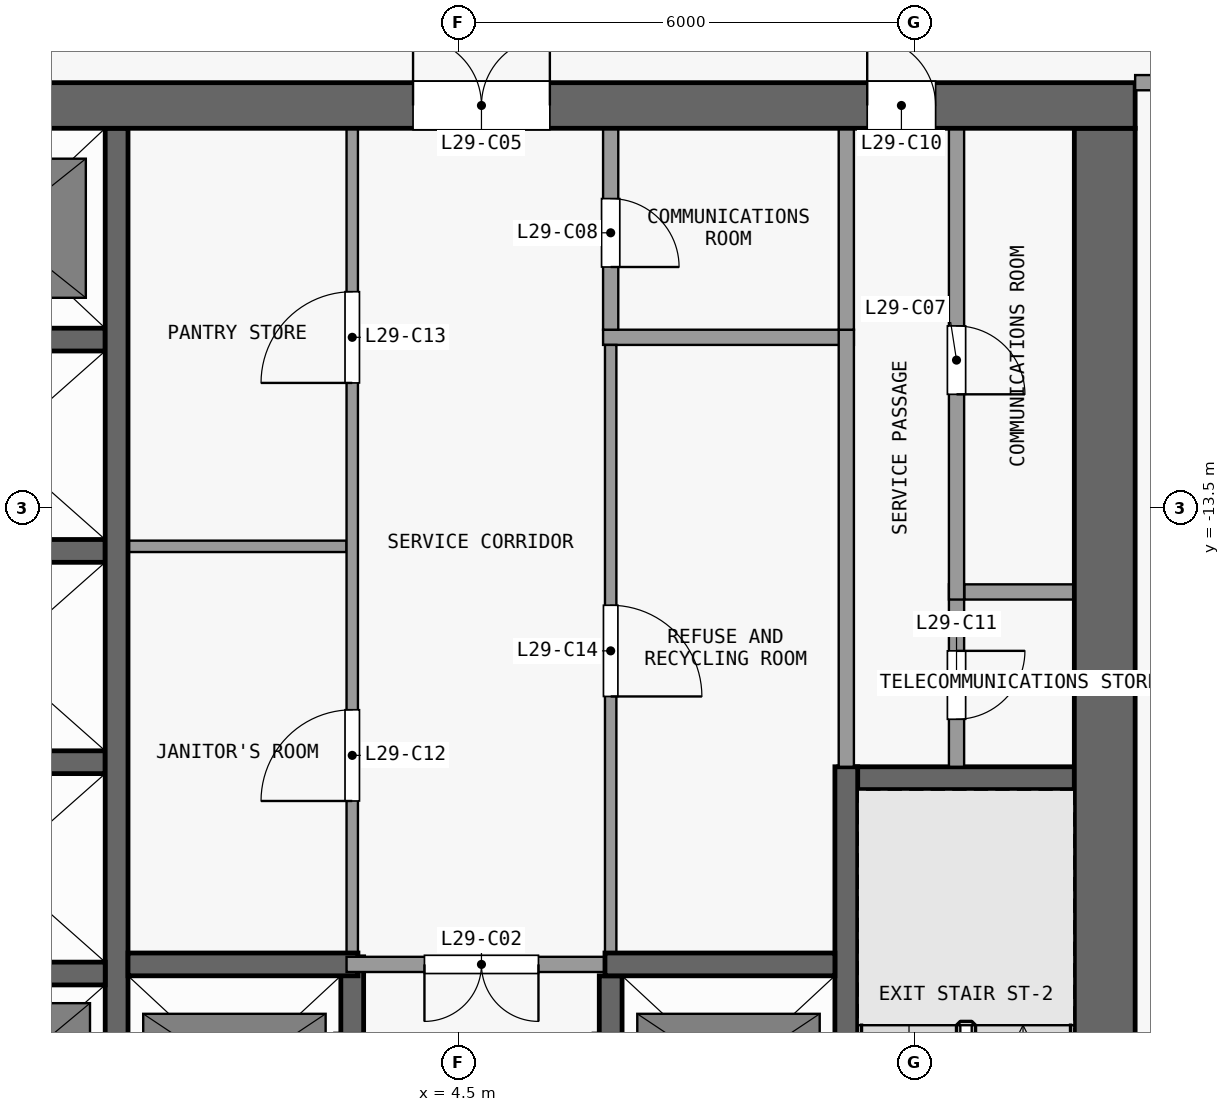
"""IFC4 building model, lengths in metres.
Left out: names, types, materials, properties, quantities, classifications, styles, units other than length and angle.
Written with IfcOpenShell. Run it as: python <this file> out.ifc"""

import sys

from ifc_helpers import new_model, si_unit, direction, frame, frame_2d, origin, place, context, subcontext, project, spatial, rectangle, extrude, element, fill, save


model = new_model("IFC4")
c1 = context("Model", 3, precision=1e-05, world=origin(), true_north=direction((0.0, 1.0)))
c2 = subcontext(c1, "Body", "Model", "MODEL_VIEW")
j1 = project(units=[si_unit("LENGTHUNIT", "METRE"), si_unit("PLANEANGLEUNIT", "RADIAN")], contexts=[c1])
p1 = place(None, origin())
s1 = spatial("IfcSite", under=j1, at=p1, CompositionType="ELEMENT")
p2 = place(p1, origin())
s2 = spatial("IfcBuilding", under=s1, at=p2, CompositionType="ELEMENT")
p3 = place(p2, frame((0.0, 0.0, 117.1)))
s3 = spatial("IfcBuildingStorey", under=s2, at=p3, CompositionType="ELEMENT", Elevation=117.1)
p4 = place(p3, frame((-13.4, -8.2, 0.0), z_axis=(0.0, 0.0, 1.0), x_axis=(1.0, 0.0, 0.0)))
e1 = element("IfcWall", 1, at=p4, inside=s3, PredefinedType="SHEAR", context=c2, shape_type="SweptSolid", body=[
    extrude(rectangle(XDim=26.8, YDim=0.6, at=frame_2d((13.4, 0.0))), origin(), (0.0, 0.0, 1.0), 3.3),
])
p5 = place(p4, frame((7.7, 0.0, 0.0)))
e2 = element("IfcOpeningElement", 2, at=p5, cuts=e1, PredefinedType="OPENING", context=c2, shape_type="SweptSolid", body=[
    extrude(rectangle(XDim=1.8, YDim=2.1, at=frame_2d((0.9, 1.05))), frame((0.0, 0.31, 0.0), z_axis=(0.0, -1.0, 0.0), x_axis=(1.0, 0.0, 0.0)), (0.0, 0.0, 1.0), 0.62),
])
p6 = place(p4, frame((17.3, 0.0, 0.0)))
e3 = element("IfcOpeningElement", 3, at=p6, cuts=e1, PredefinedType="OPENING", context=c2, shape_type="SweptSolid", body=[
    extrude(rectangle(XDim=1.8, YDim=2.1, at=frame_2d((0.9, 1.05))), frame((0.0, 0.31, 0.0), z_axis=(0.0, -1.0, 0.0), x_axis=(1.0, 0.0, 0.0)), (0.0, 0.0, 1.0), 0.62),
])
p7 = place(p4, frame((1.625, 0.0, 0.0)))
e4 = element("IfcOpeningElement", 4, at=p7, cuts=e1, PredefinedType="OPENING", context=c2, shape_type="SweptSolid", body=[
    extrude(rectangle(XDim=1.2, YDim=2.1, at=frame_2d((0.6, 1.05))), frame((0.0, 0.31, 0.0), z_axis=(0.0, -1.0, 0.0), x_axis=(1.0, 0.0, 0.0)), (0.0, 0.0, 1.0), 0.62),
])
p8 = place(p4, frame((23.275, 0.0, 0.0)))
e5 = element("IfcOpeningElement", 5, at=p8, cuts=e1, PredefinedType="OPENING", context=c2, shape_type="SweptSolid", body=[
    extrude(rectangle(XDim=0.9, YDim=2.1, at=frame_2d((0.45, 1.05))), frame((0.0, 0.31, 0.0), z_axis=(0.0, -1.0, 0.0), x_axis=(1.0, 0.0, 0.0)), (0.0, 0.0, 1.0), 0.62),
])
p9 = place(p3, frame((13.0, -24.6, 0.0), z_axis=(0.0, 0.0, 1.0), x_axis=(0.0, 1.0, 0.0)))
e6 = element("IfcWall", 6, at=p9, inside=s3, PredefinedType="SHEAR", context=c2, shape_type="SweptSolid", body=[
    extrude(rectangle(XDim=16.1, YDim=0.8, at=frame_2d((8.05, 0.0))), origin(), (0.0, 0.0, 1.0), 3.3),
])
p10 = place(p3, frame((-2.95, -19.62, 0.0), z_axis=(0.0, 0.0, 1.0), x_axis=(1.0, 0.0, 0.0)))
e7 = element("IfcWall", 7, at=p10, inside=s3, PredefinedType="SHEAR", context=c2, shape_type="SweptSolid", body=[
    extrude(rectangle(XDim=2.8, YDim=0.3, at=frame_2d((1.4, 0.0))), origin(), (0.0, 0.0, 1.0), 3.3),
])
p11 = place(p3, frame((0.15, -19.5, 0.0), z_axis=(0.0, 0.0, 1.0), x_axis=(1.0, 0.0, 0.0)))
e8 = element("IfcWall", 8, at=p11, inside=s3, PredefinedType="SHEAR", context=c2, shape_type="SweptSolid", body=[
    extrude(rectangle(XDim=3.025, YDim=0.3, at=frame_2d((1.513, 0.0))), origin(), (0.0, 0.0, 1.0), 3.3),
])
p12 = place(p3, frame((6.575, -19.5, 0.0), z_axis=(0.0, 0.0, 1.0), x_axis=(-1.0, 0.0, 0.0)))
e9 = element("IfcWall", 9, at=p12, inside=s3, PredefinedType="PARTITIONING", context=c2, shape_type="SweptSolid", body=[
    extrude(rectangle(XDim=3.55, YDim=0.2, at=frame_2d((1.775, 0.0))), origin(), (0.0, 0.0, 1.0), 3.3),
])
p13 = place(p12, frame((1.025, 0.0, 0.0)))
e10 = element("IfcOpeningElement", 10, at=p13, cuts=e9, PredefinedType="OPENING", context=c2, shape_type="SweptSolid", body=[
    extrude(rectangle(XDim=1.5, YDim=2.1, at=frame_2d((0.75, 1.05))), frame((0.0, 0.11, 0.0), z_axis=(0.0, -1.0, 0.0), x_axis=(1.0, 0.0, 0.0)), (0.0, 0.0, 1.0), 0.22),
])
p14 = place(p3, frame((6.425, -19.5, 0.0), z_axis=(0.0, 0.0, 1.0), x_axis=(1.0, 0.0, 0.0)))
e11 = element("IfcWall", 11, at=p14, inside=s3, PredefinedType="SHEAR", context=c2, shape_type="SweptSolid", body=[
    extrude(rectangle(XDim=3.025, YDim=0.3, at=frame_2d((1.512, 0.0))), origin(), (0.0, 0.0, 1.0), 3.3),
])
p15 = place(p3, frame((9.5, -17.05, 0.0), z_axis=(0.0, 0.0, 1.0), x_axis=(1.0, 0.0, 0.0)))
e12 = element("IfcWall", 12, at=p15, inside=s3, PredefinedType="SHEAR", context=c2, shape_type="SweptSolid", body=[
    extrude(rectangle(XDim=3.1, YDim=0.3, at=frame_2d((1.55, 0.0))), origin(), (0.0, 0.0, 1.0), 3.3),
])
p16 = place(p3, frame((-2.95, -16.84, 0.0), z_axis=(0.0, 0.0, 1.0), x_axis=(1.0, 0.0, 0.0)))
e13 = element("IfcWall", 13, at=p16, inside=s3, PredefinedType="SHEAR", context=c2, shape_type="SweptSolid", body=[
    extrude(rectangle(XDim=2.8, YDim=0.3, at=frame_2d((1.4, 0.0))), origin(), (0.0, 0.0, 1.0), 3.3),
])
p17 = place(p3, frame((11.15, -14.6, 0.0), z_axis=(0.0, 0.0, 1.0), x_axis=(1.0, 0.0, 0.0)))
e14 = element("IfcWall", 14, at=p17, inside=s3, PredefinedType="PARTITIONING", context=c2, shape_type="SweptSolid", body=[
    extrude(rectangle(XDim=1.45, YDim=0.2, at=frame_2d((0.725, 0.0))), origin(), (0.0, 0.0, 1.0), 3.3),
])
p18 = place(p3, frame((-2.95, -14.06, 0.0), z_axis=(0.0, 0.0, 1.0), x_axis=(1.0, 0.0, 0.0)))
e15 = element("IfcWall", 15, at=p18, inside=s3, PredefinedType="SHEAR", context=c2, shape_type="SweptSolid", body=[
    extrude(rectangle(XDim=2.8, YDim=0.3, at=frame_2d((1.4, 0.0))), origin(), (0.0, 0.0, 1.0), 3.3),
])
p19 = place(p3, frame((0.15, -14.0, 0.0), z_axis=(0.0, 0.0, 1.0), x_axis=(1.0, 0.0, 0.0)))
e16 = element("IfcWall", 16, at=p19, inside=s3, PredefinedType="PARTITIONING", context=c2, shape_type="SweptSolid", body=[
    extrude(rectangle(XDim=2.875, YDim=0.15, at=frame_2d((1.438, 0.0))), origin(), (0.0, 0.0, 1.0), 3.3),
])
p20 = place(p3, frame((-2.95, -11.28, 0.0), z_axis=(0.0, 0.0, 1.0), x_axis=(1.0, 0.0, 0.0)))
e17 = element("IfcWall", 17, at=p20, inside=s3, PredefinedType="SHEAR", context=c2, shape_type="SweptSolid", body=[
    extrude(rectangle(XDim=2.8, YDim=0.3, at=frame_2d((1.4, 0.0))), origin(), (0.0, 0.0, 1.0), 3.3),
])
p21 = place(p3, frame((6.4, -11.25, 0.0), z_axis=(0.0, 0.0, 1.0), x_axis=(1.0, 0.0, 0.0)))
e18 = element("IfcWall", 18, at=p21, inside=s3, PredefinedType="PARTITIONING", context=c2, shape_type="SweptSolid", body=[
    extrude(rectangle(XDim=3.3, YDim=0.2, at=frame_2d((1.65, 0.0))), origin(), (0.0, 0.0, 1.0), 3.3),
])
p22 = place(p3, frame((0.0, -22.25, 0.0), z_axis=(0.0, 0.0, 1.0), x_axis=(0.0, 1.0, 0.0)))
e19 = element("IfcWall", 19, at=p22, inside=s3, PredefinedType="SHEAR", context=c2, shape_type="SweptSolid", body=[
    extrude(rectangle(XDim=13.75, YDim=0.3, at=frame_2d((6.875, 0.0))), origin(), (0.0, 0.0, 1.0), 3.3),
])
p23 = place(p3, frame((3.1, -22.25, 0.0), z_axis=(0.0, 0.0, 1.0), x_axis=(0.0, 1.0, 0.0)))
e20 = element("IfcWall", 20, at=p23, inside=s3, PredefinedType="SHEAR", context=c2, shape_type="SweptSolid", body=[
    extrude(rectangle(XDim=2.85, YDim=0.3, at=frame_2d((1.425, 0.0))), origin(), (0.0, 0.0, 1.0), 3.3),
])
p24 = place(p23, frame((0.75, 0.0, 0.0)))
e21 = element("IfcOpeningElement", 21, at=p24, cuts=e20, PredefinedType="OPENING", context=c2, shape_type="SweptSolid", body=[
    extrude(rectangle(XDim=1.1, YDim=2.1, at=frame_2d((0.55, 1.05))), frame((0.0, 0.16, 0.0), z_axis=(0.0, -1.0, 0.0), x_axis=(1.0, 0.0, 0.0)), (0.0, 0.0, 1.0), 0.32),
])
p25 = place(p3, frame((3.1, -19.4, 0.0), z_axis=(0.0, 0.0, 1.0), x_axis=(0.0, 1.0, 0.0)))
e22 = element("IfcWall", 22, at=p25, inside=s3, PredefinedType="PARTITIONING", context=c2, shape_type="SweptSolid", body=[
    extrude(rectangle(XDim=10.9, YDim=0.15, at=frame_2d((5.45, 0.0))), origin(), (0.0, 0.0, 1.0), 3.3),
])
p26 = place(p25, frame((2.05, 0.0, 0.0)))
e23 = element("IfcOpeningElement", 23, at=p26, cuts=e22, PredefinedType="OPENING", context=c2, shape_type="SweptSolid", body=[
    extrude(rectangle(XDim=1.2, YDim=2.1, at=frame_2d((0.6, 1.05))), frame((0.0, 0.085, 0.0), z_axis=(0.0, -1.0, 0.0), x_axis=(1.0, 0.0, 0.0)), (0.0, 0.0, 1.0), 0.17),
])
p27 = place(p25, frame((7.55, 0.0, 0.0)))
e24 = element("IfcOpeningElement", 24, at=p27, cuts=e22, PredefinedType="OPENING", context=c2, shape_type="SweptSolid", body=[
    extrude(rectangle(XDim=1.2, YDim=2.1, at=frame_2d((0.6, 1.05))), frame((0.0, 0.085, 0.0), z_axis=(0.0, -1.0, 0.0), x_axis=(1.0, 0.0, 0.0)), (0.0, 0.0, 1.0), 0.17),
])
p28 = place(p3, frame((6.5, -22.25, 0.0), z_axis=(0.0, 0.0, 1.0), x_axis=(0.0, 1.0, 0.0)))
e25 = element("IfcWall", 25, at=p28, inside=s3, PredefinedType="SHEAR", context=c2, shape_type="SweptSolid", body=[
    extrude(rectangle(XDim=2.6, YDim=0.3, at=frame_2d((1.3, 0.0))), origin(), (0.0, 0.0, 1.0), 3.3),
])
p29 = place(p28, frame((0.75, 0.0, 0.0)))
e26 = element("IfcOpeningElement", 26, at=p29, cuts=e25, PredefinedType="OPENING", context=c2, shape_type="SweptSolid", body=[
    extrude(rectangle(XDim=1.1, YDim=2.1, at=frame_2d((0.55, 1.05))), frame((0.0, 0.16, 0.0), z_axis=(0.0, -1.0, 0.0), x_axis=(1.0, 0.0, 0.0)), (0.0, 0.0, 1.0), 0.32),
])
p30 = place(p3, frame((6.5, -11.35, 0.0), z_axis=(0.0, 0.0, 1.0), x_axis=(0.0, -1.0, 0.0)))
e27 = element("IfcWall", 27, at=p30, inside=s3, PredefinedType="PARTITIONING", context=c2, shape_type="SweptSolid", body=[
    extrude(rectangle(XDim=8.0, YDim=0.15, at=frame_2d((4.0, 0.0))), origin(), (0.0, 0.0, 1.0), 3.3),
])
p31 = place(p30, frame((3.425, 0.0, 0.0)))
e28 = element("IfcOpeningElement", 28, at=p31, cuts=e27, PredefinedType="OPENING", context=c2, shape_type="SweptSolid", body=[
    extrude(rectangle(XDim=1.2, YDim=2.1, at=frame_2d((0.6, 1.05))), frame((0.0, 0.085, 0.0), z_axis=(0.0, -1.0, 0.0), x_axis=(1.0, 0.0, 0.0)), (0.0, 0.0, 1.0), 0.17),
])
p32 = place(p3, frame((6.5, -8.5, 0.0), z_axis=(0.0, 0.0, 1.0), x_axis=(0.0, -1.0, 0.0)))
e29 = element("IfcWall", 29, at=p32, inside=s3, PredefinedType="PARTITIONING", context=c2, shape_type="SweptSolid", body=[
    extrude(rectangle(XDim=2.65, YDim=0.2, at=frame_2d((1.325, 0.0))), origin(), (0.0, 0.0, 1.0), 3.3),
])
p33 = place(p32, frame((0.925, 0.0, 0.0)))
e30 = element("IfcOpeningElement", 30, at=p33, cuts=e29, PredefinedType="OPENING", context=c2, shape_type="SweptSolid", body=[
    extrude(rectangle(XDim=0.9, YDim=2.1, at=frame_2d((0.45, 1.05))), frame((0.0, 0.11, 0.0), z_axis=(0.0, -1.0, 0.0), x_axis=(1.0, 0.0, 0.0)), (0.0, 0.0, 1.0), 0.22),
])
p34 = place(p3, frame((9.6, -16.9, 0.0), z_axis=(0.0, 0.0, 1.0), x_axis=(0.0, -1.0, 0.0)))
e31 = element("IfcWall", 31, at=p34, inside=s3, PredefinedType="SHEAR", context=c2, shape_type="SweptSolid", body=[
    extrude(rectangle(XDim=7.7, YDim=0.3, at=frame_2d((3.85, 0.0))), origin(), (0.0, 0.0, 1.0), 3.3),
])
p35 = place(p34, frame((6.5, 0.0, 0.0)))
e32 = element("IfcOpeningElement", 32, at=p35, cuts=e31, PredefinedType="OPENING", context=c2, shape_type="SweptSolid", body=[
    extrude(rectangle(XDim=1.1, YDim=2.1, at=frame_2d((0.55, 1.05))), frame((0.0, 0.16, 0.0), z_axis=(0.0, -1.0, 0.0), x_axis=(1.0, 0.0, 0.0)), (0.0, 0.0, 1.0), 0.32),
])
p36 = place(p3, frame((9.6, -16.9, 0.0), z_axis=(0.0, 0.0, 1.0), x_axis=(0.0, 1.0, 0.0)))
e33 = element("IfcWall", 33, at=p36, inside=s3, PredefinedType="PARTITIONING", context=c2, shape_type="SweptSolid", body=[
    extrude(rectangle(XDim=5.75, YDim=0.2, at=frame_2d((2.875, 0.0))), origin(), (0.0, 0.0, 1.0), 3.3),
])
p37 = place(p3, frame((9.6, -11.15, 0.0), z_axis=(0.0, 0.0, 1.0), x_axis=(0.0, 1.0, 0.0)))
e34 = element("IfcWall", 34, at=p37, inside=s3, PredefinedType="PARTITIONING", context=c2, shape_type="SweptSolid", body=[
    extrude(rectangle(XDim=2.65, YDim=0.2, at=frame_2d((1.325, 0.0))), origin(), (0.0, 0.0, 1.0), 3.3),
])
p38 = place(p3, frame((11.05, -14.5, 0.0), z_axis=(0.0, 0.0, 1.0), x_axis=(0.0, -1.0, 0.0)))
e35 = element("IfcWall", 35, at=p38, inside=s3, PredefinedType="PARTITIONING", context=c2, shape_type="SweptSolid", body=[
    extrude(rectangle(XDim=2.4, YDim=0.2, at=frame_2d((1.2, 0.0))), origin(), (0.0, 0.0, 1.0), 3.3),
])
p39 = place(p38, frame((0.875, 0.0, 0.0)))
e36 = element("IfcOpeningElement", 36, at=p39, cuts=e35, PredefinedType="OPENING", context=c2, shape_type="SweptSolid", body=[
    extrude(rectangle(XDim=0.9, YDim=2.1, at=frame_2d((0.45, 1.05))), frame((0.0, 0.11, 0.0), z_axis=(0.0, -1.0, 0.0), x_axis=(1.0, 0.0, 0.0)), (0.0, 0.0, 1.0), 0.22),
])
p40 = place(p3, frame((11.05, -8.5, 0.0), z_axis=(0.0, 0.0, 1.0), x_axis=(0.0, -1.0, 0.0)))
e37 = element("IfcWall", 37, at=p40, inside=s3, PredefinedType="PARTITIONING", context=c2, shape_type="SweptSolid", body=[
    extrude(rectangle(XDim=6.2, YDim=0.2, at=frame_2d((3.1, 0.0))), origin(), (0.0, 0.0, 1.0), 3.3),
])
p41 = place(p40, frame((2.6, 0.0, 0.0)))
e38 = element("IfcOpeningElement", 38, at=p41, cuts=e37, PredefinedType="OPENING", context=c2, shape_type="SweptSolid", body=[
    extrude(rectangle(XDim=0.9, YDim=2.1, at=frame_2d((0.45, 1.05))), frame((0.0, 0.11, 0.0), z_axis=(0.0, -1.0, 0.0), x_axis=(1.0, 0.0, 0.0)), (0.0, 0.0, 1.0), 0.22),
])
p42 = place(p3, frame((13.4, -7.9, 0.0), z_axis=(0.0, 0.0, 1.0), x_axis=(1.0, 0.0, 0.0)))
e39 = element("IfcWall", 39, at=p42, inside=s3, PredefinedType="PARTITIONING", context=c2, shape_type="SweptSolid", body=[
    extrude(rectangle(XDim=10.45, YDim=0.2, at=frame_2d((5.225, 0.0))), origin(), (0.0, 0.0, 1.0), 3.3),
])
p43 = place(p42, frame((1.0, 0.0, 0.0)))
e40 = element("IfcOpeningElement", 40, at=p43, cuts=e39, PredefinedType="OPENING", context=c2, shape_type="SweptSolid", body=[
    extrude(rectangle(XDim=1.0, YDim=2.1, at=frame_2d((0.5, 1.05))), frame((0.0, 0.11, 0.0), z_axis=(0.0, -1.0, 0.0), x_axis=(1.0, 0.0, 0.0)), (0.0, 0.0, 1.0), 0.22),
])
p44 = place(p13, origin())
e41 = element("IfcDoor", 41, at=p44, inside=s3, OperationType="DOUBLE_DOOR_SINGLE_SWING", PredefinedType="DOOR", context=c2, shape_type="SweptSolid", body=[
    extrude(rectangle(XDim=1.5, YDim=2.1, at=frame_2d((0.75, 1.05))), frame((0.0, 0.025, 0.0), z_axis=(0.0, -1.0, 0.0), x_axis=(1.0, 0.0, 0.0)), (0.0, 0.0, 1.0), 0.05),
])
fill(e10, e41)
p45 = place(p6, origin())
e42 = element("IfcDoor", 42, at=p45, inside=s3, OperationType="DOUBLE_DOOR_SINGLE_SWING", PredefinedType="DOOR", context=c2, shape_type="SweptSolid", body=[
    extrude(rectangle(XDim=1.8, YDim=2.1, at=frame_2d((0.9, 1.05))), frame((0.0, 0.025, 0.0), z_axis=(0.0, -1.0, 0.0), x_axis=(1.0, 0.0, 0.0)), (0.0, 0.0, 1.0), 0.05),
])
fill(e3, e42)
p46 = place(p41, origin())
e43 = element("IfcDoor", 43, at=p46, inside=s3, OperationType="SINGLE_SWING_RIGHT", PredefinedType="DOOR", context=c2, shape_type="SweptSolid", body=[
    extrude(rectangle(XDim=0.9, YDim=2.1, at=frame_2d((0.45, 1.05))), frame((0.0, 0.025, 0.0), z_axis=(0.0, -1.0, 0.0), x_axis=(1.0, 0.0, 0.0)), (0.0, 0.0, 1.0), 0.05),
])
fill(e38, e43)
p47 = place(p33, origin())
e44 = element("IfcDoor", 44, at=p47, inside=s3, OperationType="SINGLE_SWING_RIGHT", PredefinedType="DOOR", context=c2, shape_type="SweptSolid", body=[
    extrude(rectangle(XDim=0.9, YDim=2.1, at=frame_2d((0.45, 1.05))), frame((0.0, 0.025, 0.0), z_axis=(0.0, -1.0, 0.0), x_axis=(1.0, 0.0, 0.0)), (0.0, 0.0, 1.0), 0.05),
])
fill(e30, e44)
p48 = place(p8, origin())
e45 = element("IfcDoor", 45, at=p48, inside=s3, OperationType="SINGLE_SWING_LEFT", PredefinedType="DOOR", context=c2, shape_type="SweptSolid", body=[
    extrude(rectangle(XDim=0.9, YDim=2.1, at=frame_2d((0.45, 1.05))), frame((0.0, 0.025, 0.0), z_axis=(0.0, -1.0, 0.0), x_axis=(1.0, 0.0, 0.0)), (0.0, 0.0, 1.0), 0.05),
])
fill(e5, e45)
p49 = place(p39, origin())
e46 = element("IfcDoor", 46, at=p49, inside=s3, OperationType="SINGLE_SWING_LEFT", PredefinedType="DOOR", context=c2, shape_type="SweptSolid", body=[
    extrude(rectangle(XDim=0.9, YDim=2.1, at=frame_2d((0.45, 1.05))), frame((0.0, 0.025, 0.0), z_axis=(0.0, -1.0, 0.0), x_axis=(1.0, 0.0, 0.0)), (0.0, 0.0, 1.0), 0.05),
])
fill(e36, e46)
p50 = place(p26, origin())
e47 = element("IfcDoor", 47, at=p50, inside=s3, OperationType="SINGLE_SWING_LEFT", PredefinedType="DOOR", context=c2, shape_type="SweptSolid", body=[
    extrude(rectangle(XDim=1.2, YDim=2.1, at=frame_2d((0.6, 1.05))), frame((0.0, 0.025, 0.0), z_axis=(0.0, -1.0, 0.0), x_axis=(1.0, 0.0, 0.0)), (0.0, 0.0, 1.0), 0.05),
])
fill(e23, e47)
p51 = place(p27, origin())
e48 = element("IfcDoor", 48, at=p51, inside=s3, OperationType="SINGLE_SWING_LEFT", PredefinedType="DOOR", context=c2, shape_type="SweptSolid", body=[
    extrude(rectangle(XDim=1.2, YDim=2.1, at=frame_2d((0.6, 1.05))), frame((0.0, 0.025, 0.0), z_axis=(0.0, -1.0, 0.0), x_axis=(1.0, 0.0, 0.0)), (0.0, 0.0, 1.0), 0.05),
])
fill(e24, e48)
p52 = place(p31, origin())
e49 = element("IfcDoor", 49, at=p52, inside=s3, OperationType="SINGLE_SWING_RIGHT", PredefinedType="DOOR", context=c2, shape_type="SweptSolid", body=[
    extrude(rectangle(XDim=1.2, YDim=2.1, at=frame_2d((0.6, 1.05))), frame((0.0, 0.025, 0.0), z_axis=(0.0, -1.0, 0.0), x_axis=(1.0, 0.0, 0.0)), (0.0, 0.0, 1.0), 0.05),
])
fill(e28, e49)
save(model, sys.argv[1])
